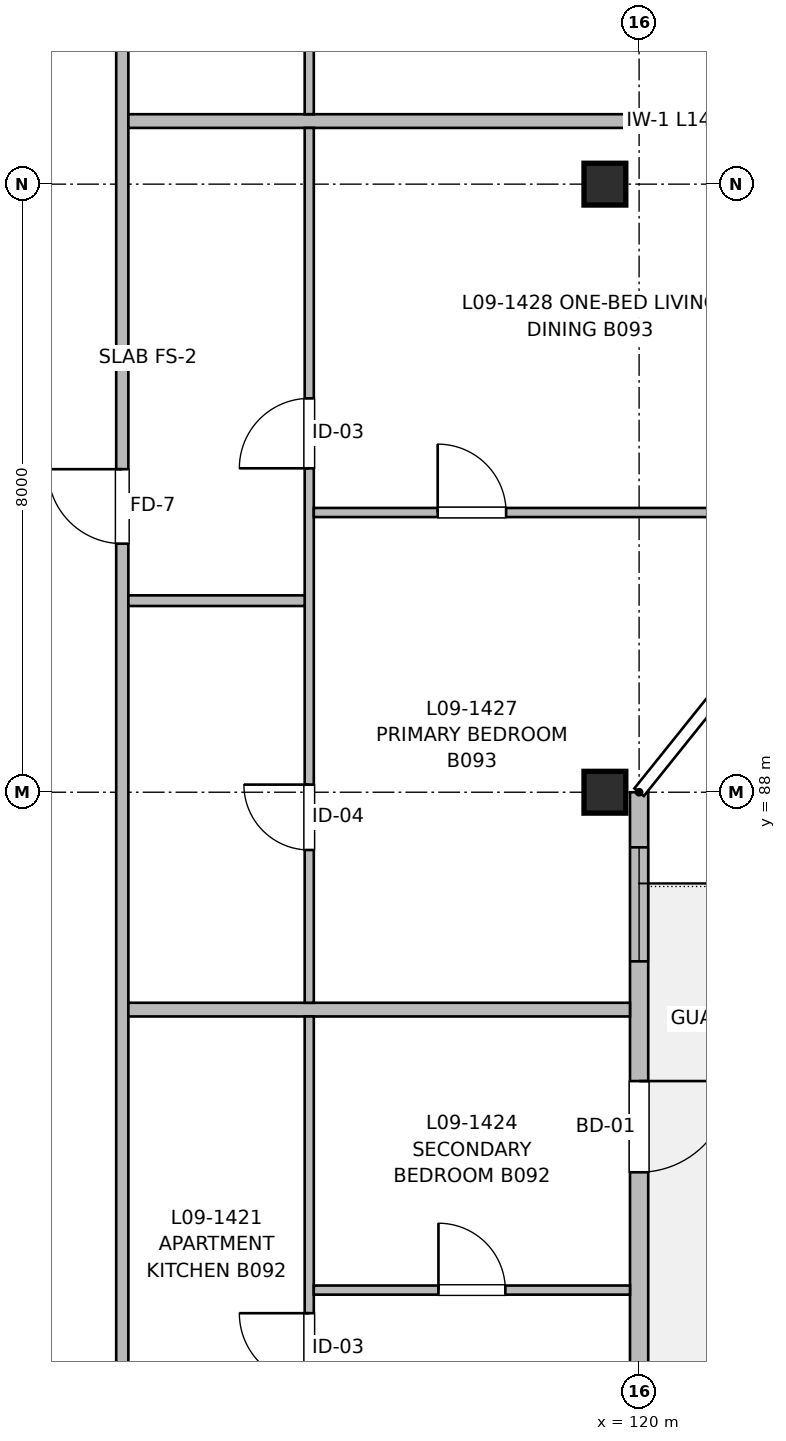
"""IFC4 building model, lengths in metres.
Left out: names, types, materials, properties, quantities, classifications, styles, units other than length and angle.
Written with IfcOpenShell. Run it as: python <this file> out.ifc"""

import sys

from ifc_helpers import new_model, si_unit, direction, frame, frame_2d, origin, origin_2d, place, context, subcontext, project, spatial, rectangle, extrude, element, fill, save


model = new_model("IFC4")
c1 = context("Model", 3, precision=1e-05, world=origin(), true_north=direction((0.0, 1.0)))
c2 = subcontext(c1, "Body", "Model", "MODEL_VIEW")
j1 = project(units=[si_unit("LENGTHUNIT", "METRE"), si_unit("PLANEANGLEUNIT", "RADIAN")], contexts=[c1])
p1 = place(None, origin())
s1 = spatial("IfcSite", under=j1, at=p1, CompositionType="ELEMENT")
p2 = place(p1, origin())
s2 = spatial("IfcBuilding", under=s1, at=p2, CompositionType="ELEMENT")
p3 = place(p2, frame((0.0, 0.0, 29.76)))
s3 = spatial("IfcBuildingStorey", under=s2, at=p3, CompositionType="ELEMENT", Elevation=29.76)
for number, where, z_axis, x_axis in (
    (1, (119.55, 88.0, 0.0), (0.0, 0.0, 1.0), (1.0, 0.0, 0.0)),
    (2, (119.55, 96.0, 0.0), (0.0, 0.0, 1.0), (1.0, 0.0, 0.0)),
):
    element("IfcColumn", number, at=place(p3, frame(where, z_axis=z_axis, x_axis=x_axis)), inside=s3, PredefinedType="COLUMN", context=c2, shape_type="SweptSolid", body=[
        extrude(rectangle(XDim=0.55, YDim=0.55, at=origin_2d()), origin(), (0.0, 0.0, 1.0), 3.2),
    ])
p4 = place(p3, frame((120.0, 88.0, 0.0), z_axis=(0.0, 0.0, 1.0), x_axis=(0.0, -1.0, 0.0)))
e3 = element("IfcWall", 3, at=p4, inside=s3, PredefinedType="SOLIDWALL", context=c2, shape_type="SweptSolid", body=[
    extrude(rectangle(XDim=26.4, YDim=0.24, at=frame_2d((13.2, 0.0))), origin(), (0.0, 0.0, 1.0), 2.98),
])
p5 = place(p4, frame((3.8, 0.0, 0.0)))
e4 = element("IfcOpeningElement", 4, at=p5, cuts=e3, PredefinedType="OPENING", context=c2, shape_type="SweptSolid", body=[
    extrude(rectangle(XDim=1.2, YDim=2.2, at=frame_2d((0.6, 1.1))), frame((0.0, 0.13, 0.0), z_axis=(0.0, -1.0, 0.0), x_axis=(1.0, 0.0, 0.0)), (0.0, 0.0, 1.0), 0.26),
])
p6 = place(p4, frame((8.7, 0.0, 0.57)))
e5 = element("IfcOpeningElement", 5, at=p6, cuts=e3, PredefinedType="OPENING", context=c2, shape_type="SweptSolid", body=[
    extrude(rectangle(XDim=2.3, YDim=1.65, at=frame_2d((1.15, 0.825))), frame((0.0, 0.13, 0.0), z_axis=(0.0, -1.0, 0.0), x_axis=(1.0, 0.0, 0.0)), (0.0, 0.0, 1.0), 0.26),
])
p7 = place(p4, frame((12.425, 0.0, 0.82)))
e6 = element("IfcOpeningElement", 6, at=p7, cuts=e3, PredefinedType="OPENING", context=c2, shape_type="SweptSolid", body=[
    extrude(rectangle(XDim=1.55, YDim=1.4, at=frame_2d((0.775, 0.7))), frame((0.0, 0.13, 0.0), z_axis=(0.0, -1.0, 0.0), x_axis=(1.0, 0.0, 0.0)), (0.0, 0.0, 1.0), 0.26),
])
p8 = place(p4, frame((21.3, 0.0, 0.87)))
e7 = element("IfcOpeningElement", 7, at=p8, cuts=e3, PredefinedType="OPENING", context=c2, shape_type="SweptSolid", body=[
    extrude(rectangle(XDim=1.4, YDim=1.35, at=frame_2d((0.7, 0.675))), frame((0.0, 0.13, 0.0), z_axis=(0.0, -1.0, 0.0), x_axis=(1.0, 0.0, 0.0)), (0.0, 0.0, 1.0), 0.26),
])
p9 = place(p4, frame((17.12, 0.0, 0.82)))
e8 = element("IfcOpeningElement", 8, at=p9, cuts=e3, PredefinedType="OPENING", context=c2, shape_type="SweptSolid", body=[
    extrude(rectangle(XDim=1.5, YDim=1.4, at=frame_2d((0.75, 0.7))), frame((0.0, 0.13, 0.0), z_axis=(0.0, -1.0, 0.0), x_axis=(1.0, 0.0, 0.0)), (0.0, 0.0, 1.0), 0.26),
])
p10 = place(p4, frame((0.725, 0.0, 0.82)))
e9 = element("IfcOpeningElement", 9, at=p10, cuts=e3, PredefinedType="OPENING", context=c2, shape_type="SweptSolid", body=[
    extrude(rectangle(XDim=1.5, YDim=1.4, at=frame_2d((0.75, 0.7))), frame((0.0, 0.13, 0.0), z_axis=(0.0, -1.0, 0.0), x_axis=(1.0, 0.0, 0.0)), (0.0, 0.0, 1.0), 0.26),
])
p11 = place(p3, frame((113.2, 61.76, 0.0), z_axis=(0.0, 0.0, 1.0), x_axis=(0.0, 1.0, 0.0)))
e10 = element("IfcWall", 10, at=p11, inside=s3, PredefinedType="PARTITIONING", context=c2, shape_type="SweptSolid", body=[
    extrude(rectangle(XDim=45.04, YDim=0.16, at=frame_2d((22.52, 0.0))), origin(), (0.0, 0.0, 1.0), 2.935),
])
p12 = place(p11, frame((5.67, 0.0, 0.0)))
e11 = element("IfcOpeningElement", 11, at=p12, cuts=e10, PredefinedType="OPENING", context=c2, shape_type="SweptSolid", body=[
    extrude(rectangle(XDim=0.98, YDim=2.15, at=frame_2d((0.49, 1.075))), frame((0.0, 0.09, 0.0), z_axis=(0.0, -1.0, 0.0), x_axis=(1.0, 0.0, 0.0)), (0.0, 0.0, 1.0), 0.18),
])
p13 = place(p11, frame((17.34, 0.0, 0.0)))
e12 = element("IfcOpeningElement", 12, at=p13, cuts=e10, PredefinedType="OPENING", context=c2, shape_type="SweptSolid", body=[
    extrude(rectangle(XDim=1.02, YDim=2.15, at=frame_2d((0.51, 1.075))), frame((0.0, 0.09, 0.0), z_axis=(0.0, -1.0, 0.0), x_axis=(1.0, 0.0, 0.0)), (0.0, 0.0, 1.0), 0.18),
])
p14 = place(p11, frame((29.51, 0.0, 0.0)))
e13 = element("IfcOpeningElement", 13, at=p14, cuts=e10, PredefinedType="OPENING", context=c2, shape_type="SweptSolid", body=[
    extrude(rectangle(XDim=0.98, YDim=2.15, at=frame_2d((0.49, 1.075))), frame((0.0, 0.09, 0.0), z_axis=(0.0, -1.0, 0.0), x_axis=(1.0, 0.0, 0.0)), (0.0, 0.0, 1.0), 0.18),
])
p15 = place(p11, frame((40.42, 0.0, 0.0)))
e14 = element("IfcOpeningElement", 14, at=p15, cuts=e10, PredefinedType="OPENING", context=c2, shape_type="SweptSolid", body=[
    extrude(rectangle(XDim=0.98, YDim=2.15, at=frame_2d((0.49, 1.075))), frame((0.0, 0.09, 0.0), z_axis=(0.0, -1.0, 0.0), x_axis=(1.0, 0.0, 0.0)), (0.0, 0.0, 1.0), 0.18),
])
p16 = place(p3, frame((113.28, 85.14, 0.0), z_axis=(0.0, 0.0, 1.0), x_axis=(1.0, 0.0, 0.0)))
e15 = element("IfcWall", 15, at=p16, inside=s3, PredefinedType="PARTITIONING", context=c2, shape_type="SweptSolid", body=[
    extrude(rectangle(XDim=6.6, YDim=0.18, at=frame_2d((3.3, 0.0))), origin(), (0.0, 0.0, 1.0), 2.935),
])
p17 = place(p3, frame((113.28, 96.83, 0.0), z_axis=(0.0, 0.0, 1.0), x_axis=(1.0, 0.0, 0.0)))
e16 = element("IfcWall", 16, at=p17, inside=s3, PredefinedType="PARTITIONING", context=c2, shape_type="SweptSolid", body=[
    extrude(rectangle(XDim=14.705, YDim=0.18, at=frame_2d((7.352, 0.0))), origin(), (0.0, 0.0, 1.0), 2.935),
])
p18 = place(p3, frame((115.66, 72.64, 0.0), z_axis=(0.0, 0.0, 1.0), x_axis=(0.0, 1.0, 0.0)))
e17 = element("IfcWall", 17, at=p18, inside=s3, PredefinedType="PARTITIONING", context=c2, shape_type="SweptSolid", body=[
    extrude(rectangle(XDim=12.41, YDim=0.12, at=frame_2d((6.205, 0.0))), origin(), (0.0, 0.0, 1.0), 2.935),
])
p19 = place(p18, frame((2.17, 0.0, 0.0)))
e18 = element("IfcOpeningElement", 18, at=p19, cuts=e17, PredefinedType="OPENING", context=c2, shape_type="SweptSolid", body=[
    extrude(rectangle(XDim=0.94, YDim=2.1, at=frame_2d((0.47, 1.05))), frame((0.0, 0.07, 0.0), z_axis=(0.0, -1.0, 0.0), x_axis=(1.0, 0.0, 0.0)), (0.0, 0.0, 1.0), 0.14),
])
p20 = place(p18, frame((7.586, 0.0, 0.0)))
e19 = element("IfcOpeningElement", 19, at=p20, cuts=e17, PredefinedType="OPENING", context=c2, shape_type="SweptSolid", body=[
    extrude(rectangle(XDim=0.92, YDim=2.1, at=frame_2d((0.46, 1.05))), frame((0.0, 0.07, 0.0), z_axis=(0.0, -1.0, 0.0), x_axis=(1.0, 0.0, 0.0)), (0.0, 0.0, 1.0), 0.14),
])
p21 = place(p3, frame((115.72, 81.45, 0.0), z_axis=(0.0, 0.0, 1.0), x_axis=(1.0, 0.0, 0.0)))
e20 = element("IfcWall", 20, at=p21, inside=s3, PredefinedType="PARTITIONING", context=c2, shape_type="SweptSolid", body=[
    extrude(rectangle(XDim=4.16, YDim=0.12, at=frame_2d((2.08, 0.0))), origin(), (0.0, 0.0, 1.0), 2.935),
])
p22 = place(p21, frame((1.64, 0.0, 0.0)))
e21 = element("IfcOpeningElement", 21, at=p22, cuts=e20, PredefinedType="OPENING", context=c2, shape_type="SweptSolid", body=[
    extrude(rectangle(XDim=0.88, YDim=2.1, at=frame_2d((0.44, 1.05))), frame((0.0, 0.07, 0.0), z_axis=(0.0, -1.0, 0.0), x_axis=(1.0, 0.0, 0.0)), (0.0, 0.0, 1.0), 0.14),
])
p23 = place(p3, frame((115.66, 85.23, 0.0), z_axis=(0.0, 0.0, 1.0), x_axis=(0.0, 1.0, 0.0)))
e22 = element("IfcWall", 22, at=p23, inside=s3, PredefinedType="PARTITIONING", context=c2, shape_type="SweptSolid", body=[
    extrude(rectangle(XDim=11.51, YDim=0.12, at=frame_2d((5.755, 0.0))), origin(), (0.0, 0.0, 1.0), 2.935),
])
p24 = place(p23, frame((2.01, 0.0, 0.0)))
e23 = element("IfcOpeningElement", 23, at=p24, cuts=e22, PredefinedType="OPENING", context=c2, shape_type="SweptSolid", body=[
    extrude(rectangle(XDim=0.86, YDim=2.1, at=frame_2d((0.43, 1.05))), frame((0.0, 0.07, 0.0), z_axis=(0.0, -1.0, 0.0), x_axis=(1.0, 0.0, 0.0)), (0.0, 0.0, 1.0), 0.14),
])
p25 = place(p23, frame((7.031, 0.0, 0.0)))
e24 = element("IfcOpeningElement", 24, at=p25, cuts=e22, PredefinedType="OPENING", context=c2, shape_type="SweptSolid", body=[
    extrude(rectangle(XDim=0.92, YDim=2.1, at=frame_2d((0.46, 1.05))), frame((0.0, 0.07, 0.0), z_axis=(0.0, -1.0, 0.0), x_axis=(1.0, 0.0, 0.0)), (0.0, 0.0, 1.0), 0.14),
])
p26 = place(p3, frame((113.28, 90.52, 0.0), z_axis=(0.0, 0.0, 1.0), x_axis=(1.0, 0.0, 0.0)))
e25 = element("IfcWall", 25, at=p26, inside=s3, PredefinedType="PARTITIONING", context=c2, shape_type="SweptSolid", body=[
    extrude(rectangle(XDim=2.32, YDim=0.14, at=frame_2d((1.16, 0.0))), origin(), (0.0, 0.0, 1.0), 2.935),
])
p27 = place(p3, frame((115.72, 91.68, 0.0), z_axis=(0.0, 0.0, 1.0), x_axis=(1.0, 0.0, 0.0)))
e26 = element("IfcWall", 26, at=p27, inside=s3, PredefinedType="PARTITIONING", context=c2, shape_type="SweptSolid", body=[
    extrude(rectangle(XDim=7.181, YDim=0.12, at=frame_2d((3.59, 0.0))), origin(), (0.0, 0.0, 1.0), 2.935),
])
p28 = place(p27, frame((1.63, 0.0, 0.0)))
e27 = element("IfcOpeningElement", 27, at=p28, cuts=e26, PredefinedType="OPENING", context=c2, shape_type="SweptSolid", body=[
    extrude(rectangle(XDim=0.9, YDim=2.1, at=frame_2d((0.45, 1.05))), frame((0.0, 0.07, 0.0), z_axis=(0.0, -1.0, 0.0), x_axis=(1.0, 0.0, 0.0)), (0.0, 0.0, 1.0), 0.14),
])
p29 = place(p3, frame((115.66, 96.92, 0.0), z_axis=(0.0, 0.0, 1.0), x_axis=(0.0, 1.0, 0.0)))
e28 = element("IfcWall", 28, at=p29, inside=s3, PredefinedType="PARTITIONING", context=c2, shape_type="SweptSolid", body=[
    extrude(rectangle(XDim=9.8, YDim=0.12, at=frame_2d((4.9, 0.0))), origin(), (0.0, 0.0, 1.0), 2.68),
])
p30 = place(p29, frame((1.714, 0.0, 0.0)))
e29 = element("IfcOpeningElement", 29, at=p30, cuts=e28, PredefinedType="OPENING", context=c2, shape_type="SweptSolid", body=[
    extrude(rectangle(XDim=0.86, YDim=2.1, at=frame_2d((0.43, 1.05))), frame((0.0, 0.07, 0.0), z_axis=(0.0, -1.0, 0.0), x_axis=(1.0, 0.0, 0.0)), (0.0, 0.0, 1.0), 0.14),
])
p31 = place(p29, frame((5.991, 0.0, 0.0)))
e30 = element("IfcOpeningElement", 30, at=p31, cuts=e28, PredefinedType="OPENING", context=c2, shape_type="SweptSolid", body=[
    extrude(rectangle(XDim=0.92, YDim=2.1, at=frame_2d((0.46, 1.05))), frame((0.0, 0.07, 0.0), z_axis=(0.0, -1.0, 0.0), x_axis=(1.0, 0.0, 0.0)), (0.0, 0.0, 1.0), 0.14),
])
p32 = place(p5, origin())
e31 = element("IfcDoor", 31, at=p32, inside=s3, OperationType="SINGLE_SWING_LEFT", PredefinedType="DOOR", context=c2, shape_type="SweptSolid", body=[
    extrude(rectangle(XDim=1.2, YDim=2.2, at=frame_2d((0.6, 1.1))), frame((0.0, 0.025, 0.0), z_axis=(0.0, -1.0, 0.0), x_axis=(1.0, 0.0, 0.0)), (0.0, 0.0, 1.0), 0.05),
])
fill(e4, e31)
p33 = place(p20, origin())
e32 = element("IfcDoor", 32, at=p33, inside=s3, OperationType="SINGLE_SWING_RIGHT", PredefinedType="DOOR", context=c2, shape_type="SweptSolid", body=[
    extrude(rectangle(XDim=0.92, YDim=2.1, at=frame_2d((0.46, 1.05))), frame((0.0, 0.025, 0.0), z_axis=(0.0, -1.0, 0.0), x_axis=(1.0, 0.0, 0.0)), (0.0, 0.0, 1.0), 0.05),
])
fill(e19, e32)
p34 = place(p22, origin())
e33 = element("IfcDoor", 33, at=p34, inside=s3, OperationType="SINGLE_SWING_LEFT", PredefinedType="DOOR", context=c2, shape_type="SweptSolid", body=[
    extrude(rectangle(XDim=0.88, YDim=2.1, at=frame_2d((0.44, 1.05))), frame((0.0, 0.025, 0.0), z_axis=(0.0, -1.0, 0.0), x_axis=(1.0, 0.0, 0.0)), (0.0, 0.0, 1.0), 0.05),
])
fill(e21, e33)
p35 = place(p24, origin())
e34 = element("IfcDoor", 34, at=p35, inside=s3, OperationType="SINGLE_SWING_RIGHT", PredefinedType="DOOR", context=c2, shape_type="SweptSolid", body=[
    extrude(rectangle(XDim=0.86, YDim=2.1, at=frame_2d((0.43, 1.05))), frame((0.0, 0.025, 0.0), z_axis=(0.0, -1.0, 0.0), x_axis=(1.0, 0.0, 0.0)), (0.0, 0.0, 1.0), 0.05),
])
fill(e23, e34)
p36 = place(p25, origin())
e35 = element("IfcDoor", 35, at=p36, inside=s3, OperationType="SINGLE_SWING_LEFT", PredefinedType="DOOR", context=c2, shape_type="SweptSolid", body=[
    extrude(rectangle(XDim=0.92, YDim=2.1, at=frame_2d((0.46, 1.05))), frame((0.0, 0.025, 0.0), z_axis=(0.0, -1.0, 0.0), x_axis=(1.0, 0.0, 0.0)), (0.0, 0.0, 1.0), 0.05),
])
fill(e24, e35)
p37 = place(p14, origin())
e36 = element("IfcDoor", 36, at=p37, inside=s3, OperationType="SINGLE_SWING_RIGHT", PredefinedType="DOOR", context=c2, shape_type="SweptSolid", body=[
    extrude(rectangle(XDim=0.98, YDim=2.15, at=frame_2d((0.49, 1.075))), frame((0.0, 0.025, 0.0), z_axis=(0.0, -1.0, 0.0), x_axis=(1.0, 0.0, 0.0)), (0.0, 0.0, 1.0), 0.05),
])
fill(e13, e36)
p38 = place(p28, origin())
e37 = element("IfcDoor", 37, at=p38, inside=s3, OperationType="SINGLE_SWING_LEFT", PredefinedType="DOOR", context=c2, shape_type="SweptSolid", body=[
    extrude(rectangle(XDim=0.9, YDim=2.1, at=frame_2d((0.45, 1.05))), frame((0.0, 0.025, 0.0), z_axis=(0.0, -1.0, 0.0), x_axis=(1.0, 0.0, 0.0)), (0.0, 0.0, 1.0), 0.05),
])
fill(e27, e37)
p39 = place(p10, origin())
e38 = element("IfcWindow", 38, at=p39, inside=s3, PartitioningType="SINGLE_PANEL", PredefinedType="WINDOW", context=c2, shape_type="SweptSolid", body=[
    extrude(rectangle(XDim=1.5, YDim=1.4, at=frame_2d((0.75, 0.7))), frame((0.0, 0.03, 0.0), z_axis=(0.0, -1.0, 0.0), x_axis=(1.0, 0.0, 0.0)), (0.0, 0.0, 1.0), 0.06),
])
fill(e9, e38)
save(model, sys.argv[1])
